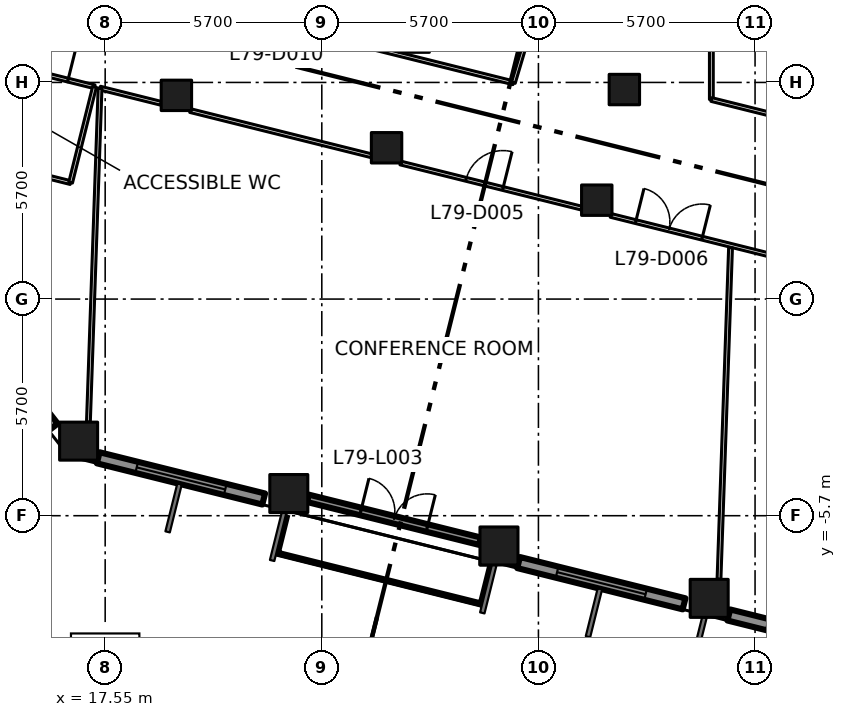
"""IFC4 building model, lengths in metres.
Left out: names, types, materials, properties, quantities, classifications, styles, units other than length and angle.
Written with IfcOpenShell. Run it as: python <this file> out.ifc"""

import sys

from ifc_helpers import new_model, si_unit, direction, frame, frame_2d, origin, origin_2d, place, context, subcontext, project, spatial, rectangle, extrude, element, fill, save


model = new_model("IFC4")
c1 = context("Model", 3, precision=1e-05, world=origin(), true_north=direction((0.0, 1.0)))
c2 = subcontext(c1, "Body", "Model", "MODEL_VIEW")
j1 = project(units=[si_unit("LENGTHUNIT", "METRE"), si_unit("PLANEANGLEUNIT", "RADIAN")], contexts=[c1])
p1 = place(None, origin())
s1 = spatial("IfcSite", under=j1, at=p1, CompositionType="ELEMENT")
p2 = place(p1, origin())
s2 = spatial("IfcBuilding", under=s1, at=p2, CompositionType="ELEMENT")
p3 = place(p2, frame((0.0, 0.0, 344.4)))
s3 = spatial("IfcBuildingStorey", under=s2, at=p3, CompositionType="ELEMENT", Elevation=344.4)
for number, where, z_axis, x_axis in (
    (1, (16.851, -3.738, 0.0), (0.0, 0.0, 1.0), (1.0, 0.0, 0.0)),
    (2, (22.382, -5.117, 0.0), (0.0, 0.0, 1.0), (1.0, 0.0, 0.0)),
    (3, (27.912, -6.496, 0.0), (0.0, 0.0, 1.0), (1.0, 0.0, 0.0)),
    (4, (33.443, -7.875, 0.0), (0.0, 0.0, 1.0), (1.0, 0.0, 0.0)),
):
    element("IfcColumn", number, at=place(p3, frame(where, z_axis=z_axis, x_axis=x_axis)), inside=s3, PredefinedType="COLUMN", context=c2, shape_type="SweptSolid", body=[
        extrude(rectangle(XDim=1.0, YDim=1.0, at=origin_2d()), origin(), (0.0, 0.0, 1.0), 4.2),
    ])
for number, where, z_axis, x_axis in (
    (5, (19.424, 5.36, 0.0), (0.0, 0.0, 1.0), (1.0, 0.0, 0.0)),
    (6, (24.954, 3.981, 0.0), (0.0, 0.0, 1.0), (1.0, 0.0, 0.0)),
    (7, (30.485, 2.602, 0.0), (0.0, 0.0, 1.0), (1.0, 0.0, 0.0)),
    (8, (31.211, 5.513, 0.0), (0.0, 0.0, 1.0), (1.0, 0.0, 0.0)),
):
    element("IfcColumn", number, at=place(p3, frame(where, z_axis=z_axis, x_axis=x_axis)), inside=s3, PredefinedType="COLUMN", context=c2, shape_type="SweptSolid", body=[
        extrude(rectangle(XDim=0.8, YDim=0.8, at=origin_2d()), origin(), (0.0, 0.0, 1.0), 4.2),
    ])
p4 = place(p3, frame((13.538, 0.016, 0.0), z_axis=(0.0, 0.0, 1.0), x_axis=(0.615713519567, -0.787970089421, 0.0)))
e9 = element("IfcWall", 9, at=p4, inside=s3, PredefinedType="SOLIDWALL", context=c2, shape_type="SweptSolid", body=[
    extrude(rectangle(XDim=4.296, YDim=0.3, at=frame_2d((2.148, 0.0))), origin(), (0.0, 0.0, 1.0), 3.05),
])
p5 = place(p4, frame((0.948, 0.0, 0.8)))
e10 = element("IfcOpeningElement", 10, at=p5, cuts=e9, PredefinedType="OPENING", context=c2, shape_type="SweptSolid", body=[
    extrude(rectangle(XDim=2.4, YDim=1.45, at=frame_2d((1.2, 0.725))), frame((0.0, 0.16, 0.0), z_axis=(0.0, -1.0, 0.0), x_axis=(1.0, 0.0, 0.0)), (0.0, 0.0, 1.0), 0.32),
])
p6 = place(p3, frame((17.367, -4.176, 0.0), z_axis=(0.0, 0.0, 1.0), x_axis=(0.970327846266, -0.241793032904, 0.0)))
e11 = element("IfcWall", 11, at=p6, inside=s3, PredefinedType="SOLIDWALL", context=c2, shape_type="SweptSolid", body=[
    extrude(rectangle(XDim=4.487, YDim=0.3, at=frame_2d((2.244, 0.0))), origin(), (0.0, 0.0, 1.0), 3.05),
])
p7 = place(p6, frame((1.044, 0.0, 0.8)))
e12 = element("IfcOpeningElement", 12, at=p7, cuts=e11, PredefinedType="OPENING", context=c2, shape_type="SweptSolid", body=[
    extrude(rectangle(XDim=2.4, YDim=1.45, at=frame_2d((1.2, 0.725))), frame((0.0, 0.16, 0.0), z_axis=(0.0, -1.0, 0.0), x_axis=(1.0, 0.0, 0.0)), (0.0, 0.0, 1.0), 0.32),
])
p8 = place(p3, frame((22.882, -5.242, 0.0), z_axis=(0.0, 0.0, 1.0), x_axis=(0.970311449929, -0.241858822739, 0.0)))
e13 = element("IfcWall", 13, at=p8, inside=s3, PredefinedType="SOLIDWALL", context=c2, shape_type="SweptSolid", body=[
    extrude(rectangle(XDim=4.669, YDim=0.2, at=frame_2d((2.334, 0.0))), origin(), (0.0, 0.0, 1.0), 3.05),
])
p9 = place(p8, frame((1.434, 0.0, 0.0)))
e14 = element("IfcOpeningElement", 14, at=p9, cuts=e13, PredefinedType="OPENING", context=c2, shape_type="SweptSolid", body=[
    extrude(rectangle(XDim=1.8, YDim=2.9, at=frame_2d((0.9, 1.45))), frame((0.0, 0.11, 0.0), z_axis=(0.0, -1.0, 0.0), x_axis=(1.0, 0.0, 0.0)), (0.0, 0.0, 1.0), 0.22),
])
p10 = place(p3, frame((22.225, -6.448, 0.0), z_axis=(0.0, 0.0, 1.0), x_axis=(0.970268314528, -0.242031811592, 0.0)))
e15 = element("IfcWall", 15, at=p10, inside=s3, PredefinedType="SOLIDWALL", context=c2, shape_type="SweptSolid", body=[
    extrude(rectangle(XDim=5.359, YDim=0.4, at=frame_2d((2.68, 0.0))), origin(), (0.0, 0.0, 1.0), 0.3),
])
p11 = place(p3, frame((28.428, -6.933, 0.0), z_axis=(0.0, 0.0, 1.0), x_axis=(0.970276766004, -0.241997928406, 0.0)))
e16 = element("IfcWall", 16, at=p11, inside=s3, PredefinedType="SOLIDWALL", context=c2, shape_type="SweptSolid", body=[
    extrude(rectangle(XDim=4.487, YDim=0.3, at=frame_2d((2.244, 0.0))), origin(), (0.0, 0.0, 1.0), 3.05),
])
p12 = place(p11, frame((1.044, 0.0, 0.8)))
e17 = element("IfcOpeningElement", 17, at=p12, cuts=e16, PredefinedType="OPENING", context=c2, shape_type="SweptSolid", body=[
    extrude(rectangle(XDim=2.4, YDim=1.45, at=frame_2d((1.2, 0.725))), frame((0.0, 0.16, 0.0), z_axis=(0.0, -1.0, 0.0), x_axis=(1.0, 0.0, 0.0)), (0.0, 0.0, 1.0), 0.32),
])
p13 = place(p3, frame((33.959, -8.312, 0.0), z_axis=(0.0, 0.0, 1.0), x_axis=(0.970276766004, -0.241997928406, 0.0)))
e18 = element("IfcWall", 18, at=p13, inside=s3, PredefinedType="SOLIDWALL", context=c2, shape_type="SweptSolid", body=[
    extrude(rectangle(XDim=4.487, YDim=0.3, at=frame_2d((2.244, 0.0))), origin(), (0.0, 0.0, 1.0), 3.05),
])
p14 = place(p13, frame((1.044, 0.0, 0.8)))
e19 = element("IfcOpeningElement", 19, at=p14, cuts=e18, PredefinedType="OPENING", context=c2, shape_type="SweptSolid", body=[
    extrude(rectangle(XDim=2.4, YDim=1.45, at=frame_2d((1.2, 0.725))), frame((0.0, 0.16, 0.0), z_axis=(0.0, -1.0, 0.0), x_axis=(1.0, 0.0, 0.0)), (0.0, 0.0, 1.0), 0.32),
])
p15 = place(p3, frame((8.333, 7.815, 0.0), z_axis=(0.0, 0.0, 1.0), x_axis=(0.970301331289, -0.241899414012, 0.0)))
e20 = element("IfcWall", 20, at=p15, inside=s3, PredefinedType="PARTITIONING", context=c2, shape_type="SweptSolid", body=[
    extrude(rectangle(XDim=9.21, YDim=0.1, at=frame_2d((4.605, 0.0))), origin(), (0.0, 0.0, 1.0), 3.75),
])
p16 = place(p15, frame((7.49, 0.0, 0.0)))
e21 = element("IfcOpeningElement", 21, at=p16, cuts=e20, PredefinedType="OPENING", context=c2, shape_type="SweptSolid", body=[
    extrude(rectangle(XDim=1.0, YDim=2.1, at=frame_2d((0.5, 1.05))), frame((0.0, 0.06, 0.0), z_axis=(0.0, -1.0, 0.0), x_axis=(1.0, 0.0, 0.0)), (0.0, 0.0, 1.0), 0.12),
])
p17 = place(p3, frame((9.002, 10.499, 0.0), z_axis=(0.0, 0.0, 1.0), x_axis=(0.970298340477, -0.241911410372, 0.0)))
e22 = element("IfcWall", 22, at=p17, inside=s3, PredefinedType="PARTITIONING", context=c2, shape_type="SweptSolid", body=[
    extrude(rectangle(XDim=19.88, YDim=0.1, at=frame_2d((9.94, 0.0))), origin(), (0.0, 0.0, 1.0), 3.75),
])
p18 = place(p17, frame((12.749, 0.0, 0.0)))
e23 = element("IfcOpeningElement", 23, at=p18, cuts=e22, PredefinedType="OPENING", context=c2, shape_type="SweptSolid", body=[
    extrude(rectangle(XDim=1.8, YDim=2.1, at=frame_2d((0.9, 1.05))), frame((0.0, 0.06, 0.0), z_axis=(0.0, -1.0, 0.0), x_axis=(1.0, 0.0, 0.0)), (0.0, 0.0, 1.0), 0.12),
])
p19 = place(p3, frame((17.415, 5.551, 0.0), z_axis=(0.0, 0.0, 1.0), x_axis=(0.970298198748, -0.241911978838, 0.0)))
e24 = element("IfcWall", 24, at=p19, inside=s3, PredefinedType="PARTITIONING", context=c2, shape_type="SweptSolid", body=[
    extrude(rectangle(XDim=1.658, YDim=0.1, at=frame_2d((0.829, 0.0))), origin(), (0.0, 0.0, 1.0), 3.75),
])
p20 = place(p3, frame((19.786, 4.96, 0.0), z_axis=(0.0, 0.0, 1.0), x_axis=(0.970288447449, -0.24195108751, 0.0)))
e25 = element("IfcWall", 25, at=p20, inside=s3, PredefinedType="PARTITIONING", context=c2, shape_type="SweptSolid", body=[
    extrude(rectangle(XDim=4.914, YDim=0.1, at=frame_2d((2.457, 0.0))), origin(), (0.0, 0.0, 1.0), 3.75),
])
p21 = place(p3, frame((25.318, 3.581, 0.0), z_axis=(0.0, 0.0, 1.0), x_axis=(0.970320559999, -0.241822271189, 0.0)))
e26 = element("IfcWall", 26, at=p21, inside=s3, PredefinedType="PARTITIONING", context=c2, shape_type="SweptSolid", body=[
    extrude(rectangle(XDim=4.913, YDim=0.1, at=frame_2d((2.456, 0.0))), origin(), (0.0, 0.0, 1.0), 3.75),
])
p22 = place(p21, frame((1.78, 0.0, 0.0)))
e27 = element("IfcOpeningElement", 27, at=p22, cuts=e26, PredefinedType="OPENING", context=c2, shape_type="SweptSolid", body=[
    extrude(rectangle(XDim=1.0, YDim=2.1, at=frame_2d((0.5, 1.05))), frame((0.0, 0.06, 0.0), z_axis=(0.0, -1.0, 0.0), x_axis=(1.0, 0.0, 0.0)), (0.0, 0.0, 1.0), 0.12),
])
p23 = place(p3, frame((30.8, 14.1, 0.0), z_axis=(0.0, 0.0, 1.0), x_axis=(-0.28588265334, -0.958264633867, 0.0)))
e28 = element("IfcWall", 28, at=p23, inside=s3, PredefinedType="PARTITIONING", context=c2, shape_type="SweptSolid", body=[
    extrude(rectangle(XDim=8.776, YDim=0.1, at=frame_2d((4.388, 0.0))), origin(), (0.0, 0.0, 1.0), 3.75),
])
p24 = place(p3, frame((30.85, 2.202, 0.0), z_axis=(0.0, 0.0, 1.0), x_axis=(0.970308932068, -0.2418689239, 0.0)))
e29 = element("IfcWall", 29, at=p24, inside=s3, PredefinedType="PARTITIONING", context=c2, shape_type="SweptSolid", body=[
    extrude(rectangle(XDim=4.912, YDim=0.1, at=frame_2d((2.456, 0.0))), origin(), (0.0, 0.0, 1.0), 3.75),
])
p25 = place(p24, frame((0.68, 0.0, 0.0)))
e30 = element("IfcOpeningElement", 30, at=p25, cuts=e29, PredefinedType="OPENING", context=c2, shape_type="SweptSolid", body=[
    extrude(rectangle(XDim=1.8, YDim=2.1, at=frame_2d((0.9, 1.05))), frame((0.0, 0.06, 0.0), z_axis=(0.0, -1.0, 0.0), x_axis=(1.0, 0.0, 0.0)), (0.0, 0.0, 1.0), 0.12),
])
p26 = place(p3, frame((33.5, 5.251, 0.0), z_axis=(0.0, 0.0, 1.0), x_axis=(0.0, 1.0, 0.0)))
e31 = element("IfcWall", 31, at=p26, inside=s3, PredefinedType="PARTITIONING", context=c2, shape_type="SweptSolid", body=[
    extrude(rectangle(XDim=8.968, YDim=0.1, at=frame_2d((4.484, 0.0))), origin(), (0.0, 0.0, 1.0), 3.75),
])
p27 = place(p3, frame((36.376, 4.534, 0.0), z_axis=(0.0, 0.0, 1.0), x_axis=(-0.970297347928, 0.241915391415, 0.0)))
e32 = element("IfcWall", 32, at=p27, inside=s3, PredefinedType="PARTITIONING", context=c2, shape_type="SweptSolid", body=[
    extrude(rectangle(XDim=2.964, YDim=0.1, at=frame_2d((1.482, 0.0))), origin(), (0.0, 0.0, 1.0), 3.75),
])
p28 = place(p3, frame((16.641, 3.064, 0.0), z_axis=(0.0, 0.0, 1.0), x_axis=(-0.970262034576, 0.242056985565, 0.0)))
e33 = element("IfcWall", 33, at=p28, inside=s3, PredefinedType="PARTITIONING", context=c2, shape_type="SweptSolid", body=[
    extrude(rectangle(XDim=2.4, YDim=0.1, at=frame_2d((1.2, 0.0))), origin(), (0.0, 0.0, 1.0), 3.75),
])
p29 = place(p3, frame((17.109, -3.238, 0.0), z_axis=(0.0, 0.0, 1.0), x_axis=(0.034812219839, 0.999393870979, 0.0)))
e34 = element("IfcWall", 34, at=p29, inside=s3, PredefinedType="PARTITIONING", context=c2, shape_type="SweptSolid", body=[
    extrude(rectangle(XDim=8.794, YDim=0.1, at=frame_2d((4.397, 0.0))), origin(), (0.0, 0.0, 1.0), 3.75),
])
p30 = place(p3, frame((17.27, 5.587, 0.0), z_axis=(0.0, 0.0, 1.0), x_axis=(-0.241872782222, -0.970307970296, 0.0)))
e35 = element("IfcWall", 35, at=p30, inside=s3, PredefinedType="PARTITIONING", context=c2, shape_type="SweptSolid", body=[
    extrude(rectangle(XDim=2.6, YDim=0.1, at=frame_2d((1.3, 0.0))), origin(), (0.0, 0.0, 1.0), 3.75),
])
p31 = place(p3, frame((33.701, -7.375, 0.0), z_axis=(0.0, 0.0, 1.0), x_axis=(0.034804076154, 0.999394154617, 0.0)))
e36 = element("IfcWall", 36, at=p31, inside=s3, PredefinedType="PARTITIONING", context=c2, shape_type="SweptSolid", body=[
    extrude(rectangle(XDim=8.733, YDim=0.1, at=frame_2d((4.367, 0.0))), origin(), (0.0, 0.0, 1.0), 3.75),
])
p32 = place(p7, origin())
e37 = element("IfcWindow", 37, at=p32, inside=s3, PartitioningType="DOUBLE_PANEL_VERTICAL", PredefinedType="WINDOW", context=c2, shape_type="SweptSolid", body=[
    extrude(rectangle(XDim=2.4, YDim=1.45, at=frame_2d((1.2, 0.725))), frame((0.0, 0.03, 0.0), z_axis=(0.0, -1.0, 0.0), x_axis=(1.0, 0.0, 0.0)), (0.0, 0.0, 1.0), 0.06),
])
fill(e12, e37)
p33 = place(p9, origin())
e38 = element("IfcDoor", 38, at=p33, inside=s3, OperationType="DOUBLE_DOOR_SINGLE_SWING", PredefinedType="DOOR", context=c2, shape_type="SweptSolid", body=[
    extrude(rectangle(XDim=1.8, YDim=2.9, at=frame_2d((0.9, 1.45))), frame((0.0, 0.025, 0.0), z_axis=(0.0, -1.0, 0.0), x_axis=(1.0, 0.0, 0.0)), (0.0, 0.0, 1.0), 0.05),
])
fill(e14, e38)
p34 = place(p12, origin())
e39 = element("IfcWindow", 39, at=p34, inside=s3, PartitioningType="DOUBLE_PANEL_VERTICAL", PredefinedType="WINDOW", context=c2, shape_type="SweptSolid", body=[
    extrude(rectangle(XDim=2.4, YDim=1.45, at=frame_2d((1.2, 0.725))), frame((0.0, 0.03, 0.0), z_axis=(0.0, -1.0, 0.0), x_axis=(1.0, 0.0, 0.0)), (0.0, 0.0, 1.0), 0.06),
])
fill(e17, e39)
p35 = place(p16, origin())
e40 = element("IfcDoor", 40, at=p35, inside=s3, OperationType="SINGLE_SWING_RIGHT", PredefinedType="DOOR", context=c2, shape_type="SweptSolid", body=[
    extrude(rectangle(XDim=1.0, YDim=2.1, at=frame_2d((0.5, 1.05))), frame((0.0, 0.025, 0.0), z_axis=(0.0, -1.0, 0.0), x_axis=(1.0, 0.0, 0.0)), (0.0, 0.0, 1.0), 0.05),
])
fill(e21, e40)
p36 = place(p22, origin())
e41 = element("IfcDoor", 41, at=p36, inside=s3, OperationType="SINGLE_SWING_RIGHT", PredefinedType="DOOR", context=c2, shape_type="SweptSolid", body=[
    extrude(rectangle(XDim=1.0, YDim=2.1, at=frame_2d((0.5, 1.05))), frame((0.0, 0.025, 0.0), z_axis=(0.0, -1.0, 0.0), x_axis=(1.0, 0.0, 0.0)), (0.0, 0.0, 1.0), 0.05),
])
fill(e27, e41)
p37 = place(p25, origin())
e42 = element("IfcDoor", 42, at=p37, inside=s3, OperationType="DOUBLE_DOOR_SINGLE_SWING", PredefinedType="DOOR", context=c2, shape_type="SweptSolid", body=[
    extrude(rectangle(XDim=1.8, YDim=2.1, at=frame_2d((0.9, 1.05))), frame((0.0, 0.025, 0.0), z_axis=(0.0, -1.0, 0.0), x_axis=(1.0, 0.0, 0.0)), (0.0, 0.0, 1.0), 0.05),
])
fill(e30, e42)
save(model, sys.argv[1])
